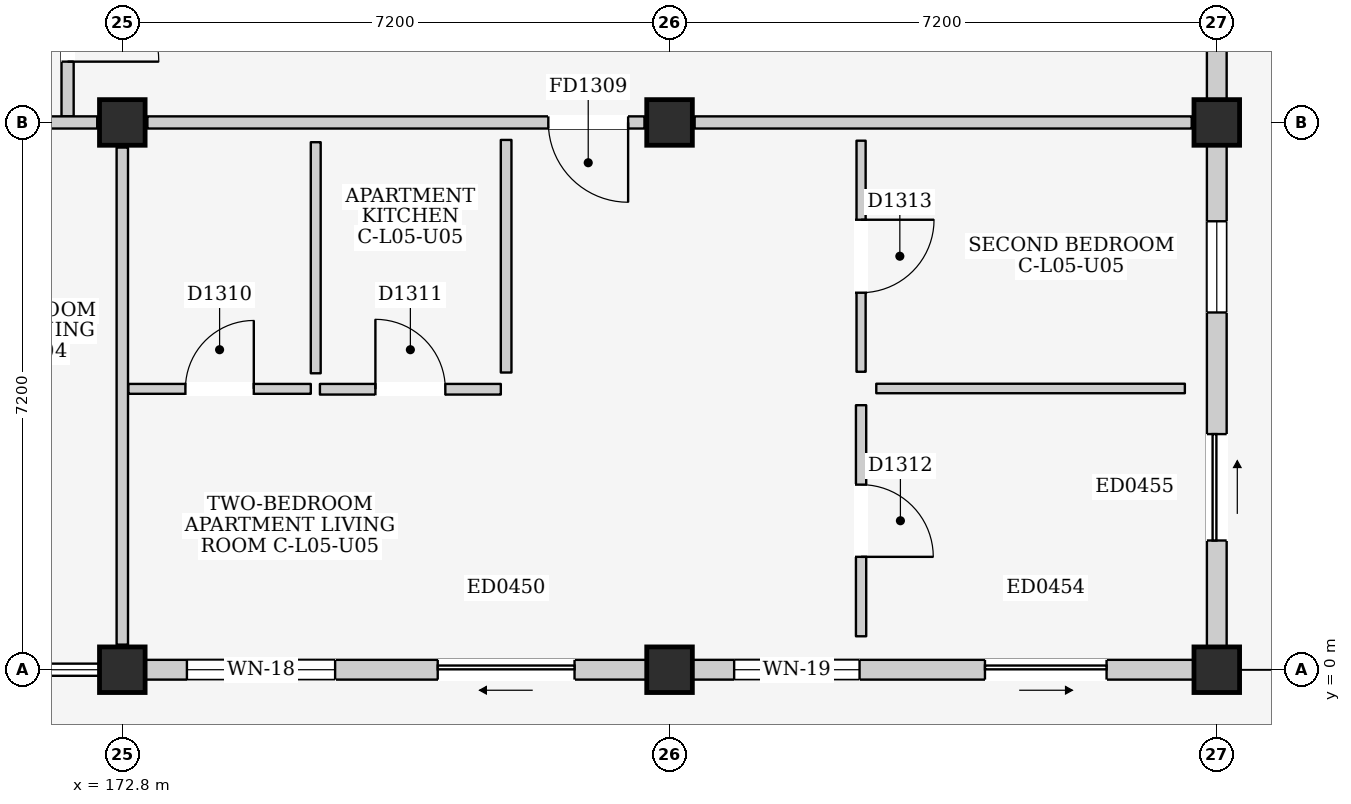
"""IFC4 building model, lengths in metres.
Left out: names, types, materials, properties, quantities, classifications, styles, units other than length and angle.
Written with IfcOpenShell. Run it as: python <this file> out.ifc"""

import sys

from ifc_helpers import new_model, si_unit, direction, frame, frame_2d, origin, origin_2d, place, context, subcontext, project, spatial, rectangle, extrude, element, fill, save


model = new_model("IFC4")
c1 = context("Model", 3, precision=1e-05, world=origin(), true_north=direction((0.0, 1.0)))
c2 = subcontext(c1, "Body", "Model", "MODEL_VIEW")
j1 = project(units=[si_unit("LENGTHUNIT", "METRE"), si_unit("PLANEANGLEUNIT", "RADIAN")], contexts=[c1])
p1 = place(None, origin())
s1 = spatial("IfcSite", under=j1, at=p1, CompositionType="ELEMENT")
p2 = place(p1, origin())
s2 = spatial("IfcBuilding", under=s1, at=p2, CompositionType="ELEMENT")
p3 = place(p2, frame((0.0, 0.0, 18.6)))
s3 = spatial("IfcBuildingStorey", under=s2, at=p3, CompositionType="ELEMENT", Elevation=18.6)
for number, where, z_axis, x_axis in (
    (1, (172.8, 0.0, 0.0), (0.0, 0.0, 1.0), (1.0, 0.0, 0.0)),
    (2, (172.8, 7.2, 0.0), (0.0, 0.0, 1.0), (1.0, 0.0, 0.0)),
    (3, (180.0, 0.0, 0.0), (0.0, 0.0, 1.0), (1.0, 0.0, 0.0)),
    (4, (180.0, 7.2, 0.0), (0.0, 0.0, 1.0), (1.0, 0.0, 0.0)),
    (5, (187.2, 0.0, 0.0), (0.0, 0.0, 1.0), (1.0, 0.0, 0.0)),
    (6, (187.2, 7.2, 0.0), (0.0, 0.0, 1.0), (1.0, 0.0, 0.0)),
):
    element("IfcColumn", number, at=place(p3, frame(where, z_axis=z_axis, x_axis=x_axis)), inside=s3, PredefinedType="COLUMN", context=c2, shape_type="SweptSolid", body=[
        extrude(rectangle(XDim=0.6, YDim=0.6, at=origin_2d()), origin(), (0.0, 0.0, 1.0), 3.3),
    ])
p4 = place(p3, frame((173.1, 0.0, 0.0), z_axis=(0.0, 0.0, 1.0), x_axis=(1.0, 0.0, 0.0)))
e7 = element("IfcWall", 7, at=p4, inside=s3, PredefinedType="ELEMENTEDWALL", context=c2, shape_type="SweptSolid", body=[
    extrude(rectangle(XDim=6.6, YDim=0.26, at=frame_2d((3.3, 0.0))), origin(), (0.0, 0.0, 1.0), 2.595),
])
p5 = place(p4, frame((3.85, 0.0, 0.0)))
e8 = element("IfcOpeningElement", 8, at=p5, cuts=e7, PredefinedType="OPENING", context=c2, shape_type="SweptSolid", body=[
    extrude(rectangle(XDim=1.8, YDim=2.12, at=frame_2d((0.9, 1.06))), frame((0.0, 0.145, 0.0), z_axis=(0.0, -1.0, 0.0), x_axis=(1.0, 0.0, 0.0)), (0.0, 0.0, 1.0), 0.29),
])
p6 = place(p4, frame((0.55, 0.0, 0.9)))
e9 = element("IfcOpeningElement", 9, at=p6, cuts=e7, PredefinedType="OPENING", context=c2, shape_type="SweptSolid", body=[
    extrude(rectangle(XDim=1.95, YDim=1.55, at=frame_2d((0.975, 0.775))), frame((0.0, 0.145, 0.0), z_axis=(0.0, -1.0, 0.0), x_axis=(1.0, 0.0, 0.0)), (0.0, 0.0, 1.0), 0.29),
])
p7 = place(p3, frame((180.3, 0.0, 0.0), z_axis=(0.0, 0.0, 1.0), x_axis=(1.0, 0.0, 0.0)))
e10 = element("IfcWall", 10, at=p7, inside=s3, PredefinedType="ELEMENTEDWALL", context=c2, shape_type="SweptSolid", body=[
    extrude(rectangle(XDim=6.6, YDim=0.26, at=frame_2d((3.3, 0.0))), origin(), (0.0, 0.0, 1.0), 2.595),
])
p8 = place(p7, frame((3.85, 0.0, 0.0)))
e11 = element("IfcOpeningElement", 11, at=p8, cuts=e10, PredefinedType="OPENING", context=c2, shape_type="SweptSolid", body=[
    extrude(rectangle(XDim=1.6, YDim=2.12, at=frame_2d((0.8, 1.06))), frame((0.0, 0.145, 0.0), z_axis=(0.0, -1.0, 0.0), x_axis=(1.0, 0.0, 0.0)), (0.0, 0.0, 1.0), 0.29),
])
p9 = place(p7, frame((0.55, 0.0, 0.9)))
e12 = element("IfcOpeningElement", 12, at=p9, cuts=e10, PredefinedType="OPENING", context=c2, shape_type="SweptSolid", body=[
    extrude(rectangle(XDim=1.65, YDim=1.35, at=frame_2d((0.825, 0.675))), frame((0.0, 0.145, 0.0), z_axis=(0.0, -1.0, 0.0), x_axis=(1.0, 0.0, 0.0)), (0.0, 0.0, 1.0), 0.29),
])
p10 = place(p3, frame((187.2, 0.3, 0.0), z_axis=(0.0, 0.0, 1.0), x_axis=(0.0, 1.0, 0.0)))
e13 = element("IfcWall", 13, at=p10, inside=s3, PredefinedType="ELEMENTEDWALL", context=c2, shape_type="SweptSolid", body=[
    extrude(rectangle(XDim=6.6, YDim=0.26, at=frame_2d((3.3, 0.0))), origin(), (0.0, 0.0, 1.0), 2.595),
])
p11 = place(p10, frame((1.4, 0.0, 0.0)))
e14 = element("IfcOpeningElement", 14, at=p11, cuts=e13, PredefinedType="OPENING", context=c2, shape_type="SweptSolid", body=[
    extrude(rectangle(XDim=1.4, YDim=2.1, at=frame_2d((0.7, 1.05))), frame((0.0, 0.145, 0.0), z_axis=(0.0, -1.0, 0.0), x_axis=(1.0, 0.0, 0.0)), (0.0, 0.0, 1.0), 0.29),
])
p12 = place(p10, frame((4.4, 0.0, 0.95)))
e15 = element("IfcOpeningElement", 15, at=p12, cuts=e13, PredefinedType="OPENING", context=c2, shape_type="SweptSolid", body=[
    extrude(rectangle(XDim=1.2, YDim=1.35, at=frame_2d((0.6, 0.675))), frame((0.0, 0.145, 0.0), z_axis=(0.0, -1.0, 0.0), x_axis=(1.0, 0.0, 0.0)), (0.0, 0.0, 1.0), 0.29),
])
p13 = place(p3, frame((187.2, 7.5, 0.0), z_axis=(0.0, 0.0, 1.0), x_axis=(0.0, 1.0, 0.0)))
e16 = element("IfcWall", 16, at=p13, inside=s3, PredefinedType="ELEMENTEDWALL", context=c2, shape_type="SweptSolid", body=[
    extrude(rectangle(XDim=6.6, YDim=0.26, at=frame_2d((3.3, 0.0))), origin(), (0.0, 0.0, 1.0), 2.595),
])
p14 = place(p13, frame((3.65, 0.0, 0.0)))
e17 = element("IfcOpeningElement", 17, at=p14, cuts=e16, PredefinedType="OPENING", context=c2, shape_type="SweptSolid", body=[
    extrude(rectangle(XDim=1.4, YDim=2.1, at=frame_2d((0.7, 1.05))), frame((0.0, 0.145, 0.0), z_axis=(0.0, -1.0, 0.0), x_axis=(1.0, 0.0, 0.0)), (0.0, 0.0, 1.0), 0.29),
])
p15 = place(p3, frame((172.08, 7.28, 0.0), z_axis=(0.0, 0.0, 1.0), x_axis=(0.0, 1.0, 0.0)))
e18 = element("IfcWall", 18, at=p15, inside=s3, PredefinedType="PARTITIONING", context=c2, shape_type="SweptSolid", body=[
    extrude(rectangle(XDim=4.32, YDim=0.16, at=frame_2d((2.16, 0.0))), origin(), (0.0, 0.0, 1.0), 3.06),
])
p16 = place(p15, frame((0.72, 0.0, 0.0)))
e19 = element("IfcOpeningElement", 19, at=p16, cuts=e18, PredefinedType="OPENING", context=c2, shape_type="SweptSolid", body=[
    extrude(rectangle(XDim=1.2, YDim=2.2, at=frame_2d((0.6, 1.1))), frame((0.0, 0.095, 0.0), z_axis=(0.0, -1.0, 0.0), x_axis=(1.0, 0.0, 0.0)), (0.0, 0.0, 1.0), 0.19),
])
p17 = place(p3, frame((165.93, 7.2, 0.0), z_axis=(0.0, 0.0, 1.0), x_axis=(1.0, 0.0, 0.0)))
e20 = element("IfcWall", 20, at=p17, inside=s3, PredefinedType="PARTITIONING", context=c2, shape_type="SweptSolid", body=[
    extrude(rectangle(XDim=6.54, YDim=0.16, at=frame_2d((3.27, 0.0))), origin(), (0.0, 0.0, 1.0), 2.445),
])
p18 = place(p17, frame((4.295, 0.0, 0.0)))
e21 = element("IfcOpeningElement", 21, at=p18, cuts=e20, PredefinedType="OPENING", context=c2, shape_type="SweptSolid", body=[
    extrude(rectangle(XDim=1.05, YDim=2.15, at=frame_2d((0.525, 1.075))), frame((0.0, 0.095, 0.0), z_axis=(0.0, -1.0, 0.0), x_axis=(1.0, 0.0, 0.0)), (0.0, 0.0, 1.0), 0.19),
])
p19 = place(p3, frame((172.8, 0.33, 0.0), z_axis=(0.0, 0.0, 1.0), x_axis=(0.0, 1.0, 0.0)))
e22 = element("IfcWall", 22, at=p19, inside=s3, PredefinedType="PARTITIONING", context=c2, shape_type="SweptSolid", body=[
    extrude(rectangle(XDim=6.54, YDim=0.15, at=frame_2d((3.27, 0.0))), origin(), (0.0, 0.0, 1.0), 2.545),
])
p20 = place(p3, frame((173.13, 7.2, 0.0), z_axis=(0.0, 0.0, 1.0), x_axis=(1.0, 0.0, 0.0)))
e23 = element("IfcWall", 23, at=p20, inside=s3, PredefinedType="PARTITIONING", context=c2, shape_type="SweptSolid", body=[
    extrude(rectangle(XDim=6.54, YDim=0.16, at=frame_2d((3.27, 0.0))), origin(), (0.0, 0.0, 1.0), 2.445),
])
p21 = place(p20, frame((5.275, 0.0, 0.0)))
e24 = element("IfcOpeningElement", 24, at=p21, cuts=e23, PredefinedType="OPENING", context=c2, shape_type="SweptSolid", body=[
    extrude(rectangle(XDim=1.05, YDim=2.15, at=frame_2d((0.525, 1.075))), frame((0.0, 0.095, 0.0), z_axis=(0.0, -1.0, 0.0), x_axis=(1.0, 0.0, 0.0)), (0.0, 0.0, 1.0), 0.19),
])
p22 = place(p3, frame((180.33, 7.2, 0.0), z_axis=(0.0, 0.0, 1.0), x_axis=(1.0, 0.0, 0.0)))
e25 = element("IfcWall", 25, at=p22, inside=s3, PredefinedType="PARTITIONING", context=c2, shape_type="SweptSolid", body=[
    extrude(rectangle(XDim=6.54, YDim=0.16, at=frame_2d((3.27, 0.0))), origin(), (0.0, 0.0, 1.0), 2.445),
])
p23 = place(p3, frame((172.88, 3.695, 0.0), z_axis=(0.0, 0.0, 1.0), x_axis=(1.0, 0.0, 0.0)))
e26 = element("IfcWall", 26, at=p23, inside=s3, PredefinedType="PARTITIONING", context=c2, shape_type="SweptSolid", body=[
    extrude(rectangle(XDim=2.4, YDim=0.13, at=frame_2d((1.2, 0.0))), origin(), (0.0, 0.0, 1.0), 3.06),
])
p24 = place(p23, frame((0.75, 0.0, 0.0)))
e27 = element("IfcOpeningElement", 27, at=p24, cuts=e26, PredefinedType="OPENING", context=c2, shape_type="SweptSolid", body=[
    extrude(rectangle(XDim=0.9, YDim=2.1, at=frame_2d((0.45, 1.05))), frame((0.0, 0.08, 0.0), z_axis=(0.0, -1.0, 0.0), x_axis=(1.0, 0.0, 0.0)), (0.0, 0.0, 1.0), 0.16),
])
p25 = place(p3, frame((175.345, 3.9, 0.0), z_axis=(0.0, 0.0, 1.0), x_axis=(0.0, 1.0, 0.0)))
e28 = element("IfcWall", 28, at=p25, inside=s3, PredefinedType="PARTITIONING", context=c2, shape_type="SweptSolid", body=[
    extrude(rectangle(XDim=3.04, YDim=0.13, at=frame_2d((1.52, 0.0))), origin(), (0.0, 0.0, 1.0), 3.06),
])
p26 = place(p3, frame((175.4, 3.69, 0.0), z_axis=(0.0, 0.0, 1.0), x_axis=(1.0, 0.0, 0.0)))
e29 = element("IfcWall", 29, at=p26, inside=s3, PredefinedType="PARTITIONING", context=c2, shape_type="SweptSolid", body=[
    extrude(rectangle(XDim=2.38, YDim=0.14, at=frame_2d((1.19, 0.0))), origin(), (0.0, 0.0, 1.0), 3.06),
])
p27 = place(p26, frame((0.73, 0.0, 0.0)))
e30 = element("IfcOpeningElement", 30, at=p27, cuts=e29, PredefinedType="OPENING", context=c2, shape_type="SweptSolid", body=[
    extrude(rectangle(XDim=0.92, YDim=2.1, at=frame_2d((0.46, 1.05))), frame((0.0, 0.085, 0.0), z_axis=(0.0, -1.0, 0.0), x_axis=(1.0, 0.0, 0.0)), (0.0, 0.0, 1.0), 0.17),
])
p28 = place(p3, frame((177.85, 3.91, 0.0), z_axis=(0.0, 0.0, 1.0), x_axis=(0.0, 1.0, 0.0)))
e31 = element("IfcWall", 31, at=p28, inside=s3, PredefinedType="PARTITIONING", context=c2, shape_type="SweptSolid", body=[
    extrude(rectangle(XDim=3.06, YDim=0.14, at=frame_2d((1.53, 0.0))), origin(), (0.0, 0.0, 1.0), 3.06),
])
p29 = place(p3, frame((182.52, 0.44, 0.0), z_axis=(0.0, 0.0, 1.0), x_axis=(0.0, 1.0, 0.0)))
e32 = element("IfcWall", 32, at=p29, inside=s3, PredefinedType="PARTITIONING", context=c2, shape_type="SweptSolid", body=[
    extrude(rectangle(XDim=3.04, YDim=0.135, at=frame_2d((1.52, 0.0))), origin(), (0.0, 0.0, 1.0), 3.06),
])
p30 = place(p29, frame((1.045, 0.0, 0.0)))
e33 = element("IfcOpeningElement", 33, at=p30, cuts=e32, PredefinedType="OPENING", context=c2, shape_type="SweptSolid", body=[
    extrude(rectangle(XDim=0.95, YDim=2.15, at=frame_2d((0.475, 1.075))), frame((0.0, 0.083, 0.0), z_axis=(0.0, -1.0, 0.0), x_axis=(1.0, 0.0, 0.0)), (0.0, 0.0, 1.0), 0.165),
])
p31 = place(p3, frame((182.72, 3.7, 0.0), z_axis=(0.0, 0.0, 1.0), x_axis=(1.0, 0.0, 0.0)))
e34 = element("IfcWall", 34, at=p31, inside=s3, PredefinedType="PARTITIONING", context=c2, shape_type="SweptSolid", body=[
    extrude(rectangle(XDim=4.06, YDim=0.125, at=frame_2d((2.03, 0.0))), origin(), (0.0, 0.0, 1.0), 3.06),
])
p32 = place(p3, frame((182.52, 3.92, 0.0), z_axis=(0.0, 0.0, 1.0), x_axis=(0.0, 1.0, 0.0)))
e35 = element("IfcWall", 35, at=p32, inside=s3, PredefinedType="PARTITIONING", context=c2, shape_type="SweptSolid", body=[
    extrude(rectangle(XDim=3.04, YDim=0.12, at=frame_2d((1.52, 0.0))), origin(), (0.0, 0.0, 1.0), 3.06),
])
p33 = place(p32, frame((1.04, 0.0, 0.0)))
e36 = element("IfcOpeningElement", 36, at=p33, cuts=e35, PredefinedType="OPENING", context=c2, shape_type="SweptSolid", body=[
    extrude(rectangle(XDim=0.96, YDim=2.15, at=frame_2d((0.48, 1.075))), frame((0.0, 0.075, 0.0), z_axis=(0.0, -1.0, 0.0), x_axis=(1.0, 0.0, 0.0)), (0.0, 0.0, 1.0), 0.15),
])
p34 = place(p5, frame((1.8, 0.0, 0.0), z_axis=(0.0, 0.0, 1.0), x_axis=(-1.0, 0.0, 0.0)))
e37 = element("IfcDoor", 37, at=p34, inside=s3, OperationType="SLIDING_TO_LEFT", PredefinedType="DOOR", context=c2, shape_type="SweptSolid", body=[
    extrude(rectangle(XDim=1.8, YDim=2.12, at=frame_2d((0.9, 1.06))), frame((0.0, 0.025, 0.0), z_axis=(0.0, -1.0, 0.0), x_axis=(1.0, 0.0, 0.0)), (0.0, 0.0, 1.0), 0.05),
])
fill(e8, e37)
p35 = place(p6, origin())
e38 = element("IfcWindow", 38, at=p35, inside=s3, PartitioningType="DOUBLE_PANEL_VERTICAL", PredefinedType="WINDOW", context=c2, shape_type="SweptSolid", body=[
    extrude(rectangle(XDim=1.95, YDim=1.55, at=frame_2d((0.975, 0.775))), frame((0.0, 0.03, 0.0), z_axis=(0.0, -1.0, 0.0), x_axis=(1.0, 0.0, 0.0)), (0.0, 0.0, 1.0), 0.06),
])
fill(e9, e38)
p36 = place(p8, frame((1.6, 0.0, 0.0), z_axis=(0.0, 0.0, 1.0), x_axis=(-1.0, 0.0, 0.0)))
e39 = element("IfcDoor", 39, at=p36, inside=s3, OperationType="SLIDING_TO_RIGHT", PredefinedType="DOOR", context=c2, shape_type="SweptSolid", body=[
    extrude(rectangle(XDim=1.6, YDim=2.12, at=frame_2d((0.8, 1.06))), frame((0.0, 0.025, 0.0), z_axis=(0.0, -1.0, 0.0), x_axis=(1.0, 0.0, 0.0)), (0.0, 0.0, 1.0), 0.05),
])
fill(e11, e39)
p37 = place(p9, origin())
e40 = element("IfcWindow", 40, at=p37, inside=s3, PartitioningType="DOUBLE_PANEL_VERTICAL", PredefinedType="WINDOW", context=c2, shape_type="SweptSolid", body=[
    extrude(rectangle(XDim=1.65, YDim=1.35, at=frame_2d((0.825, 0.675))), frame((0.0, 0.03, 0.0), z_axis=(0.0, -1.0, 0.0), x_axis=(1.0, 0.0, 0.0)), (0.0, 0.0, 1.0), 0.06),
])
fill(e12, e40)
p38 = place(p11, frame((1.4, 0.0, 0.0), z_axis=(0.0, 0.0, 1.0), x_axis=(-1.0, 0.0, 0.0)))
e41 = element("IfcDoor", 41, at=p38, inside=s3, OperationType="SLIDING_TO_RIGHT", PredefinedType="DOOR", context=c2, shape_type="SweptSolid", body=[
    extrude(rectangle(XDim=1.4, YDim=2.1, at=frame_2d((0.7, 1.05))), frame((0.0, 0.025, 0.0), z_axis=(0.0, -1.0, 0.0), x_axis=(1.0, 0.0, 0.0)), (0.0, 0.0, 1.0), 0.05),
])
fill(e14, e41)
p39 = place(p12, origin())
e42 = element("IfcWindow", 42, at=p39, inside=s3, PartitioningType="SINGLE_PANEL", PredefinedType="WINDOW", context=c2, shape_type="SweptSolid", body=[
    extrude(rectangle(XDim=1.2, YDim=1.35, at=frame_2d((0.6, 0.675))), frame((0.0, 0.03, 0.0), z_axis=(0.0, -1.0, 0.0), x_axis=(1.0, 0.0, 0.0)), (0.0, 0.0, 1.0), 0.06),
])
fill(e15, e42)
p40 = place(p16, frame((1.2, 0.0, 0.0), z_axis=(0.0, 0.0, 1.0), x_axis=(-1.0, 0.0, 0.0)))
e43 = element("IfcDoor", 43, at=p40, inside=s3, OperationType="SINGLE_SWING_RIGHT", PredefinedType="DOOR", context=c2, shape_type="SweptSolid", body=[
    extrude(rectangle(XDim=1.2, YDim=2.2, at=frame_2d((0.6, 1.1))), frame((0.0, 0.025, 0.0), z_axis=(0.0, -1.0, 0.0), x_axis=(1.0, 0.0, 0.0)), (0.0, 0.0, 1.0), 0.05),
])
fill(e19, e43)
p41 = place(p21, frame((1.05, 0.0, 0.0), z_axis=(0.0, 0.0, 1.0), x_axis=(-1.0, 0.0, 0.0)))
e44 = element("IfcDoor", 44, at=p41, inside=s3, OperationType="SINGLE_SWING_LEFT", PredefinedType="DOOR", context=c2, shape_type="SweptSolid", body=[
    extrude(rectangle(XDim=1.05, YDim=2.15, at=frame_2d((0.525, 1.075))), frame((0.0, 0.025, 0.0), z_axis=(0.0, -1.0, 0.0), x_axis=(1.0, 0.0, 0.0)), (0.0, 0.0, 1.0), 0.05),
])
fill(e24, e44)
p42 = place(p24, origin())
e45 = element("IfcDoor", 45, at=p42, inside=s3, OperationType="SINGLE_SWING_RIGHT", PredefinedType="DOOR", context=c2, shape_type="SweptSolid", body=[
    extrude(rectangle(XDim=0.9, YDim=2.1, at=frame_2d((0.45, 1.05))), frame((0.0, 0.025, 0.0), z_axis=(0.0, -1.0, 0.0), x_axis=(1.0, 0.0, 0.0)), (0.0, 0.0, 1.0), 0.05),
])
fill(e27, e45)
p43 = place(p27, origin())
e46 = element("IfcDoor", 46, at=p43, inside=s3, OperationType="SINGLE_SWING_LEFT", PredefinedType="DOOR", context=c2, shape_type="SweptSolid", body=[
    extrude(rectangle(XDim=0.92, YDim=2.1, at=frame_2d((0.46, 1.05))), frame((0.0, 0.025, 0.0), z_axis=(0.0, -1.0, 0.0), x_axis=(1.0, 0.0, 0.0)), (0.0, 0.0, 1.0), 0.05),
])
fill(e30, e46)
p44 = place(p30, frame((0.95, 0.0, 0.0), z_axis=(0.0, 0.0, 1.0), x_axis=(-1.0, 0.0, 0.0)))
e47 = element("IfcDoor", 47, at=p44, inside=s3, OperationType="SINGLE_SWING_RIGHT", PredefinedType="DOOR", context=c2, shape_type="SweptSolid", body=[
    extrude(rectangle(XDim=0.95, YDim=2.15, at=frame_2d((0.475, 1.075))), frame((0.0, 0.025, 0.0), z_axis=(0.0, -1.0, 0.0), x_axis=(1.0, 0.0, 0.0)), (0.0, 0.0, 1.0), 0.05),
])
fill(e33, e47)
p45 = place(p33, frame((0.96, 0.0, 0.0), z_axis=(0.0, 0.0, 1.0), x_axis=(-1.0, 0.0, 0.0)))
e48 = element("IfcDoor", 48, at=p45, inside=s3, OperationType="SINGLE_SWING_LEFT", PredefinedType="DOOR", context=c2, shape_type="SweptSolid", body=[
    extrude(rectangle(XDim=0.96, YDim=2.15, at=frame_2d((0.48, 1.075))), frame((0.0, 0.025, 0.0), z_axis=(0.0, -1.0, 0.0), x_axis=(1.0, 0.0, 0.0)), (0.0, 0.0, 1.0), 0.05),
])
fill(e36, e48)
save(model, sys.argv[1])
